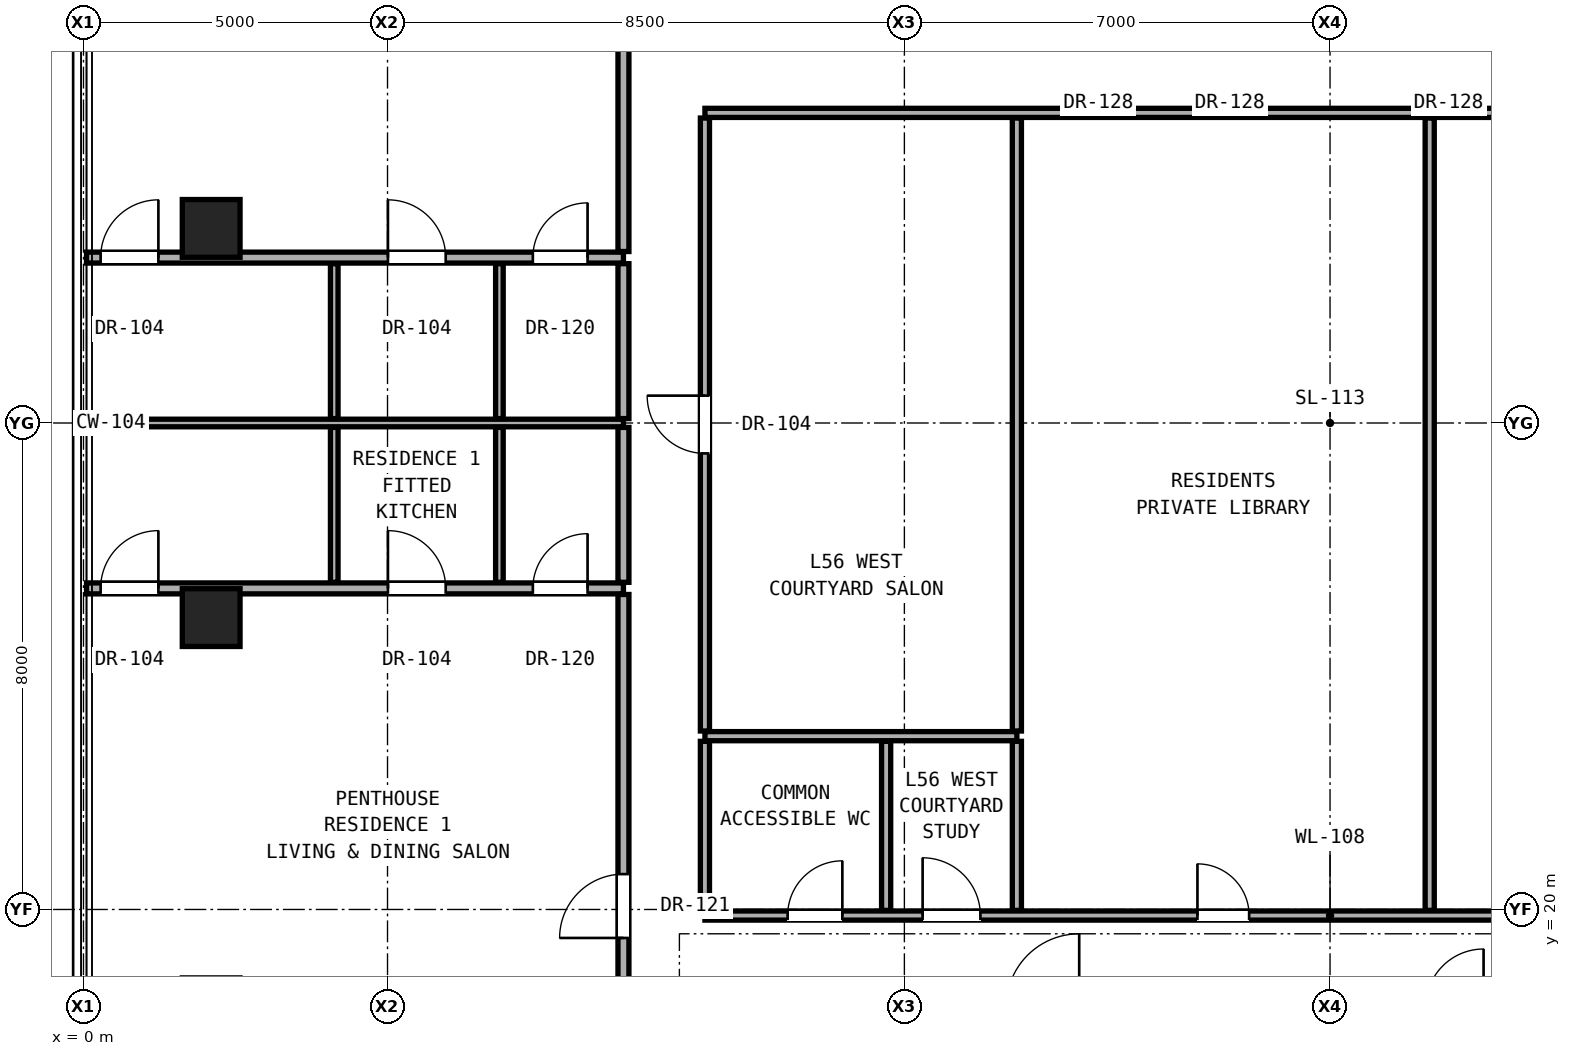
"""IFC4 building model, lengths in metres.
Left out: names, types, materials, properties, quantities, classifications, styles, units other than length and angle.
Written with IfcOpenShell. Run it as: python <this file> out.ifc"""

import sys

from ifc_helpers import new_model, si_unit, direction, frame, frame_2d, origin, origin_2d, place, context, subcontext, project, spatial, rectangle, hollow_rectangle, extrude, element, fill, save


model = new_model("IFC4")
c1 = context("Model", 3, precision=1e-05, world=origin(), true_north=direction((0.0, 1.0)))
c2 = subcontext(c1, "Body", "Model", "MODEL_VIEW")
j1 = project(units=[si_unit("LENGTHUNIT", "METRE"), si_unit("PLANEANGLEUNIT", "RADIAN")], contexts=[c1])
p1 = place(None, origin())
s1 = spatial("IfcSite", under=j1, at=p1, CompositionType="ELEMENT")
p2 = place(p1, origin())
s2 = spatial("IfcBuilding", under=s1, at=p2, CompositionType="ELEMENT")
p3 = place(p2, frame((0.0, 0.0, 196.65)))
s3 = spatial("IfcBuildingStorey", under=s2, at=p3, CompositionType="ELEMENT", Elevation=196.65)
for number, where, z_axis, x_axis in (
    (1, (2.1, 24.8, 0.0), (0.0, 0.0, 1.0), (1.0, 0.0, 0.0)),
    (2, (2.1, 31.2, 0.0), (0.0, 0.0, 1.0), (1.0, 0.0, 0.0)),
):
    element("IfcColumn", number, at=place(p3, frame(where, z_axis=z_axis, x_axis=x_axis)), inside=s3, PredefinedType="COLUMN", context=c2, shape_type="SweptSolid", body=[
        extrude(hollow_rectangle(XDim=0.95, YDim=0.95, WallThickness=0.05, at=origin_2d()), origin(), (0.0, 0.0, 1.0), 3.25),
    ])
p4 = place(p3, frame((10.22, 19.9, 0.0), z_axis=(0.0, 0.0, 1.0), x_axis=(1.0, 0.0, 0.0)))
e3 = element("IfcWall", 3, at=p4, inside=s3, PredefinedType="PARTITIONING", context=c2, shape_type="SweptSolid", body=[
    extrude(rectangle(XDim=20.56, YDim=0.15, at=frame_2d((10.28, 0.0))), origin(), (0.0, 0.0, 1.0), 2.186),
])
p5 = place(p4, frame((1.36, 0.0, 0.0)))
e4 = element("IfcOpeningElement", 4, at=p5, cuts=e3, PredefinedType="OPENING", context=c2, shape_type="SweptSolid", body=[
    extrude(rectangle(XDim=0.9, YDim=2.1, at=frame_2d((0.45, 1.05))), frame((0.0, 0.085, 0.0), z_axis=(0.0, -1.0, 0.0), x_axis=(1.0, 0.0, 0.0)), (0.0, 0.0, 1.0), 0.17),
])
p6 = place(p4, frame((3.58, 0.0, 0.0)))
e5 = element("IfcOpeningElement", 5, at=p6, cuts=e3, PredefinedType="OPENING", context=c2, shape_type="SweptSolid", body=[
    extrude(rectangle(XDim=0.95, YDim=2.15, at=frame_2d((0.475, 1.075))), frame((0.0, 0.085, 0.0), z_axis=(0.0, -1.0, 0.0), x_axis=(1.0, 0.0, 0.0)), (0.0, 0.0, 1.0), 0.17),
])
p7 = place(p4, frame((8.1, 0.0, 0.0)))
e6 = element("IfcOpeningElement", 6, at=p7, cuts=e3, PredefinedType="OPENING", context=c2, shape_type="SweptSolid", body=[
    extrude(rectangle(XDim=0.85, YDim=2.01, at=frame_2d((0.425, 1.005))), frame((0.0, 0.085, 0.0), z_axis=(0.0, -1.0, 0.0), x_axis=(1.0, 0.0, 0.0)), (0.0, 0.0, 1.0), 0.17),
])
p8 = place(p3, frame((10.22, 22.85, 0.0), z_axis=(0.0, 0.0, 1.0), x_axis=(1.0, 0.0, 0.0)))
e7 = element("IfcWall", 7, at=p8, inside=s3, PredefinedType="PARTITIONING", context=c2, shape_type="SweptSolid", body=[
    extrude(rectangle(XDim=5.13, YDim=0.15, at=frame_2d((2.565, 0.0))), origin(), (0.0, 0.0, 1.0), 2.186),
])
p9 = place(p3, frame((0.05, 25.28, 0.0), z_axis=(0.0, 0.0, 1.0), x_axis=(1.0, 0.0, 0.0)))
e8 = element("IfcWall", 8, at=p9, inside=s3, PredefinedType="PARTITIONING", context=c2, shape_type="SweptSolid", body=[
    extrude(rectangle(XDim=8.83, YDim=0.18, at=frame_2d((4.415, 0.0))), origin(), (0.0, 0.0, 1.0), 2.269),
])
p10 = place(p9, frame((0.232, 0.0, 0.0)))
e9 = element("IfcOpeningElement", 9, at=p10, cuts=e8, PredefinedType="OPENING", context=c2, shape_type="SweptSolid", body=[
    extrude(rectangle(XDim=0.95, YDim=2.15, at=frame_2d((0.475, 1.075))), frame((0.0, 0.1, 0.0), z_axis=(0.0, -1.0, 0.0), x_axis=(1.0, 0.0, 0.0)), (0.0, 0.0, 1.0), 0.2),
])
p11 = place(p9, frame((4.957, 0.0, 0.0)))
e10 = element("IfcOpeningElement", 10, at=p11, cuts=e8, PredefinedType="OPENING", context=c2, shape_type="SweptSolid", body=[
    extrude(rectangle(XDim=0.95, YDim=2.15, at=frame_2d((0.475, 1.075))), frame((0.0, 0.1, 0.0), z_axis=(0.0, -1.0, 0.0), x_axis=(1.0, 0.0, 0.0)), (0.0, 0.0, 1.0), 0.2),
])
p12 = place(p9, frame((7.34, 0.0, 0.0)))
e11 = element("IfcOpeningElement", 11, at=p12, cuts=e8, PredefinedType="OPENING", context=c2, shape_type="SweptSolid", body=[
    extrude(rectangle(XDim=0.9, YDim=2.1, at=frame_2d((0.45, 1.05))), frame((0.0, 0.1, 0.0), z_axis=(0.0, -1.0, 0.0), x_axis=(1.0, 0.0, 0.0)), (0.0, 0.0, 1.0), 0.2),
])
p13 = place(p3, frame((0.05, 28.0, 0.0), z_axis=(0.0, 0.0, 1.0), x_axis=(1.0, 0.0, 0.0)))
e12 = element("IfcWall", 12, at=p13, inside=s3, PredefinedType="PARTITIONING", context=c2, shape_type="SweptSolid", body=[
    extrude(rectangle(XDim=8.83, YDim=0.125, at=frame_2d((4.415, 0.0))), origin(), (0.0, 0.0, 1.0), 2.269),
])
p14 = place(p3, frame((0.05, 30.72, 0.0), z_axis=(0.0, 0.0, 1.0), x_axis=(1.0, 0.0, 0.0)))
e13 = element("IfcWall", 13, at=p14, inside=s3, PredefinedType="PARTITIONING", context=c2, shape_type="SweptSolid", body=[
    extrude(rectangle(XDim=8.83, YDim=0.18, at=frame_2d((4.415, 0.0))), origin(), (0.0, 0.0, 1.0), 2.269),
])
p15 = place(p14, frame((0.232, 0.0, 0.0)))
e14 = element("IfcOpeningElement", 14, at=p15, cuts=e13, PredefinedType="OPENING", context=c2, shape_type="SweptSolid", body=[
    extrude(rectangle(XDim=0.95, YDim=2.15, at=frame_2d((0.475, 1.075))), frame((0.0, 0.1, 0.0), z_axis=(0.0, -1.0, 0.0), x_axis=(1.0, 0.0, 0.0)), (0.0, 0.0, 1.0), 0.2),
])
p16 = place(p14, frame((4.957, 0.0, 0.0)))
e15 = element("IfcOpeningElement", 15, at=p16, cuts=e13, PredefinedType="OPENING", context=c2, shape_type="SweptSolid", body=[
    extrude(rectangle(XDim=0.95, YDim=2.15, at=frame_2d((0.475, 1.075))), frame((0.0, 0.1, 0.0), z_axis=(0.0, -1.0, 0.0), x_axis=(1.0, 0.0, 0.0)), (0.0, 0.0, 1.0), 0.2),
])
p17 = place(p14, frame((7.34, 0.0, 0.0)))
e16 = element("IfcOpeningElement", 16, at=p17, cuts=e13, PredefinedType="OPENING", context=c2, shape_type="SweptSolid", body=[
    extrude(rectangle(XDim=0.9, YDim=2.1, at=frame_2d((0.45, 1.05))), frame((0.0, 0.1, 0.0), z_axis=(0.0, -1.0, 0.0), x_axis=(1.0, 0.0, 0.0)), (0.0, 0.0, 1.0), 0.2),
])
p18 = place(p3, frame((10.22, 33.1, 0.0), z_axis=(0.0, 0.0, 1.0), x_axis=(1.0, 0.0, 0.0)))
e17 = element("IfcWall", 17, at=p18, inside=s3, PredefinedType="PARTITIONING", context=c2, shape_type="SweptSolid", body=[
    extrude(rectangle(XDim=20.56, YDim=0.15, at=frame_2d((10.28, 0.0))), origin(), (0.0, 0.0, 1.0), 2.186),
])
p19 = place(p18, frame((15.794, 0.0, 0.0)))
e18 = element("IfcOpeningElement", 18, at=p19, cuts=e17, PredefinedType="OPENING", context=c2, shape_type="SweptSolid", body=[
    extrude(rectangle(XDim=0.85, YDim=2.01, at=frame_2d((0.425, 1.005))), frame((0.0, 0.085, 0.0), z_axis=(0.0, -1.0, 0.0), x_axis=(1.0, 0.0, 0.0)), (0.0, 0.0, 1.0), 0.17),
])
for number, where, z_axis, x_axis in (
    (19, (4.124, 25.38, 0.0), (0.0, 0.0, 1.0), (0.0, 1.0, 0.0)),
    (20, (4.124, 28.073, 0.0), (0.0, 0.0, 1.0), (0.0, 1.0, 0.0)),
    (21, (6.84, 25.38, 0.0), (0.0, 0.0, 1.0), (0.0, 1.0, 0.0)),
    (22, (6.84, 28.073, 0.0), (0.0, 0.0, 1.0), (0.0, 1.0, 0.0)),
):
    element("IfcWall", number, at=place(p3, frame(where, z_axis=z_axis, x_axis=x_axis)), inside=s3, PredefinedType="PARTITIONING", context=c2, shape_type="SweptSolid", body=[
        extrude(rectangle(XDim=2.548, YDim=0.125, at=frame_2d((1.274, 0.0))), origin(), (0.0, 0.0, 1.0), 3.05),
    ])
p20 = place(p3, frame((8.88, 14.933, 0.0), z_axis=(0.0, 0.0, 1.0), x_axis=(0.0, 1.0, 0.0)))
e23 = element("IfcWall", 23, at=p20, inside=s3, PredefinedType="PARTITIONING", context=c2, shape_type="SweptSolid", body=[
    extrude(rectangle(XDim=10.247, YDim=0.18, at=frame_2d((5.124, 0.0))), origin(), (0.0, 0.0, 1.0), 2.346),
])
p21 = place(p20, frame((4.598, 0.0, 0.0)))
e24 = element("IfcOpeningElement", 24, at=p21, cuts=e23, PredefinedType="OPENING", context=c2, shape_type="SweptSolid", body=[
    extrude(rectangle(XDim=1.05, YDim=2.2, at=frame_2d((0.525, 1.1))), frame((0.0, 0.1, 0.0), z_axis=(0.0, -1.0, 0.0), x_axis=(1.0, 0.0, 0.0)), (0.0, 0.0, 1.0), 0.2),
])
for number, where, z_axis, x_axis in (
    (25, (8.88, 25.38, 0.0), (0.0, 0.0, 1.0), (0.0, 1.0, 0.0)),
    (26, (8.88, 28.073, 0.0), (0.0, 0.0, 1.0), (0.0, 1.0, 0.0)),
):
    element("IfcWall", number, at=place(p3, frame(where, z_axis=z_axis, x_axis=x_axis)), inside=s3, PredefinedType="PARTITIONING", context=c2, shape_type="SweptSolid", body=[
        extrude(rectangle(XDim=2.548, YDim=0.18, at=frame_2d((1.274, 0.0))), origin(), (0.0, 0.0, 1.0), 3.05),
    ])
p22 = place(p3, frame((8.88, 30.82, 0.0), z_axis=(0.0, 0.0, 1.0), x_axis=(0.0, 1.0, 0.0)))
e27 = element("IfcWall", 27, at=p22, inside=s3, PredefinedType="PARTITIONING", context=c2, shape_type="SweptSolid", body=[
    extrude(rectangle(XDim=10.247, YDim=0.18, at=frame_2d((5.124, 0.0))), origin(), (0.0, 0.0, 1.0), 2.346),
])
p23 = place(p22, frame((4.598, 0.0, 0.0)))
e28 = element("IfcOpeningElement", 28, at=p23, cuts=e27, PredefinedType="OPENING", context=c2, shape_type="SweptSolid", body=[
    extrude(rectangle(XDim=1.05, YDim=2.2, at=frame_2d((0.525, 1.1))), frame((0.0, 0.1, 0.0), z_axis=(0.0, -1.0, 0.0), x_axis=(1.0, 0.0, 0.0)), (0.0, 0.0, 1.0), 0.2),
])
p24 = place(p3, frame((10.22, 19.985, 0.0), z_axis=(0.0, 0.0, 1.0), x_axis=(0.0, 1.0, 0.0)))
e29 = element("IfcWall", 29, at=p24, inside=s3, PredefinedType="PARTITIONING", context=c2, shape_type="SweptSolid", body=[
    extrude(rectangle(XDim=2.78, YDim=0.15, at=frame_2d((1.39, 0.0))), origin(), (0.0, 0.0, 1.0), 3.05),
])
p25 = place(p3, frame((10.22, 22.935, 0.0), z_axis=(0.0, 0.0, 1.0), x_axis=(0.0, 1.0, 0.0)))
e30 = element("IfcWall", 30, at=p25, inside=s3, PredefinedType="PARTITIONING", context=c2, shape_type="SweptSolid", body=[
    extrude(rectangle(XDim=10.08, YDim=0.15, at=frame_2d((5.04, 0.0))), origin(), (0.0, 0.0, 1.0), 2.346),
])
p26 = place(p25, frame((4.565, 0.0, 0.0)))
e31 = element("IfcOpeningElement", 31, at=p26, cuts=e30, PredefinedType="OPENING", context=c2, shape_type="SweptSolid", body=[
    extrude(rectangle(XDim=0.95, YDim=2.15, at=frame_2d((0.475, 1.075))), frame((0.0, 0.085, 0.0), z_axis=(0.0, -1.0, 0.0), x_axis=(1.0, 0.0, 0.0)), (0.0, 0.0, 1.0), 0.17),
])
for number, where, z_axis, x_axis in (
    (32, (13.2, 19.985, 0.0), (0.0, 0.0, 1.0), (0.0, 1.0, 0.0)),
    (33, (15.35, 19.985, 0.0), (0.0, 0.0, 1.0), (0.0, 1.0, 0.0)),
):
    element("IfcWall", number, at=place(p3, frame(where, z_axis=z_axis, x_axis=x_axis)), inside=s3, PredefinedType="PARTITIONING", context=c2, shape_type="SweptSolid", body=[
        extrude(rectangle(XDim=2.78, YDim=0.15, at=frame_2d((1.39, 0.0))), origin(), (0.0, 0.0, 1.0), 3.05),
    ])
p27 = place(p3, frame((15.35, 22.935, 0.0), z_axis=(0.0, 0.0, 1.0), x_axis=(0.0, 1.0, 0.0)))
e34 = element("IfcWall", 34, at=p27, inside=s3, PredefinedType="PARTITIONING", context=c2, shape_type="SweptSolid", body=[
    extrude(rectangle(XDim=10.08, YDim=0.15, at=frame_2d((5.04, 0.0))), origin(), (0.0, 0.0, 1.0), 2.186),
])
p28 = place(p3, frame((22.139, 19.985, 0.0), z_axis=(0.0, 0.0, 1.0), x_axis=(0.0, 1.0, 0.0)))
e35 = element("IfcWall", 35, at=p28, inside=s3, PredefinedType="PARTITIONING", context=c2, shape_type="SweptSolid", body=[
    extrude(rectangle(XDim=13.03, YDim=0.15, at=frame_2d((6.515, 0.0))), origin(), (0.0, 0.0, 1.0), 2.186),
])
p29 = place(p5, origin())
e36 = element("IfcDoor", 36, at=p29, inside=s3, OperationType="SINGLE_SWING_RIGHT", PredefinedType="DOOR", context=c2, shape_type="SweptSolid", body=[
    extrude(rectangle(XDim=0.9, YDim=2.1, at=frame_2d((0.45, 1.05))), frame((0.0, 0.025, 0.0), z_axis=(0.0, -1.0, 0.0), x_axis=(1.0, 0.0, 0.0)), (0.0, 0.0, 1.0), 0.05),
])
fill(e4, e36)
p30 = place(p21, origin())
e37 = element("IfcDoor", 37, at=p30, inside=s3, OperationType="SINGLE_SWING_LEFT", PredefinedType="DOOR", context=c2, shape_type="SweptSolid", body=[
    extrude(rectangle(XDim=1.05, YDim=2.2, at=frame_2d((0.525, 1.1))), frame((0.0, 0.025, 0.0), z_axis=(0.0, -1.0, 0.0), x_axis=(1.0, 0.0, 0.0)), (0.0, 0.0, 1.0), 0.05),
])
fill(e24, e37)
p31 = place(p10, origin())
e38 = element("IfcDoor", 38, at=p31, inside=s3, OperationType="SINGLE_SWING_RIGHT", PredefinedType="DOOR", context=c2, shape_type="SweptSolid", body=[
    extrude(rectangle(XDim=0.95, YDim=2.15, at=frame_2d((0.475, 1.075))), frame((0.0, 0.025, 0.0), z_axis=(0.0, -1.0, 0.0), x_axis=(1.0, 0.0, 0.0)), (0.0, 0.0, 1.0), 0.05),
])
fill(e9, e38)
p32 = place(p11, origin())
e39 = element("IfcDoor", 39, at=p32, inside=s3, OperationType="SINGLE_SWING_LEFT", PredefinedType="DOOR", context=c2, shape_type="SweptSolid", body=[
    extrude(rectangle(XDim=0.95, YDim=2.15, at=frame_2d((0.475, 1.075))), frame((0.0, 0.025, 0.0), z_axis=(0.0, -1.0, 0.0), x_axis=(1.0, 0.0, 0.0)), (0.0, 0.0, 1.0), 0.05),
])
fill(e10, e39)
p33 = place(p12, origin())
e40 = element("IfcDoor", 40, at=p33, inside=s3, OperationType="SINGLE_SWING_RIGHT", PredefinedType="DOOR", context=c2, shape_type="SweptSolid", body=[
    extrude(rectangle(XDim=0.9, YDim=2.1, at=frame_2d((0.45, 1.05))), frame((0.0, 0.025, 0.0), z_axis=(0.0, -1.0, 0.0), x_axis=(1.0, 0.0, 0.0)), (0.0, 0.0, 1.0), 0.05),
])
fill(e11, e40)
p34 = place(p15, origin())
e41 = element("IfcDoor", 41, at=p34, inside=s3, OperationType="SINGLE_SWING_RIGHT", PredefinedType="DOOR", context=c2, shape_type="SweptSolid", body=[
    extrude(rectangle(XDim=0.95, YDim=2.15, at=frame_2d((0.475, 1.075))), frame((0.0, 0.025, 0.0), z_axis=(0.0, -1.0, 0.0), x_axis=(1.0, 0.0, 0.0)), (0.0, 0.0, 1.0), 0.05),
])
fill(e14, e41)
p35 = place(p16, origin())
e42 = element("IfcDoor", 42, at=p35, inside=s3, OperationType="SINGLE_SWING_LEFT", PredefinedType="DOOR", context=c2, shape_type="SweptSolid", body=[
    extrude(rectangle(XDim=0.95, YDim=2.15, at=frame_2d((0.475, 1.075))), frame((0.0, 0.025, 0.0), z_axis=(0.0, -1.0, 0.0), x_axis=(1.0, 0.0, 0.0)), (0.0, 0.0, 1.0), 0.05),
])
fill(e15, e42)
p36 = place(p17, origin())
e43 = element("IfcDoor", 43, at=p36, inside=s3, OperationType="SINGLE_SWING_RIGHT", PredefinedType="DOOR", context=c2, shape_type="SweptSolid", body=[
    extrude(rectangle(XDim=0.9, YDim=2.1, at=frame_2d((0.45, 1.05))), frame((0.0, 0.025, 0.0), z_axis=(0.0, -1.0, 0.0), x_axis=(1.0, 0.0, 0.0)), (0.0, 0.0, 1.0), 0.05),
])
fill(e16, e43)
p37 = place(p6, origin())
e44 = element("IfcDoor", 44, at=p37, inside=s3, OperationType="SINGLE_SWING_LEFT", PredefinedType="DOOR", context=c2, shape_type="SweptSolid", body=[
    extrude(rectangle(XDim=0.95, YDim=2.15, at=frame_2d((0.475, 1.075))), frame((0.0, 0.025, 0.0), z_axis=(0.0, -1.0, 0.0), x_axis=(1.0, 0.0, 0.0)), (0.0, 0.0, 1.0), 0.05),
])
fill(e5, e44)
p38 = place(p26, origin())
e45 = element("IfcDoor", 45, at=p38, inside=s3, OperationType="SINGLE_SWING_RIGHT", PredefinedType="DOOR", context=c2, shape_type="SweptSolid", body=[
    extrude(rectangle(XDim=0.95, YDim=2.15, at=frame_2d((0.475, 1.075))), frame((0.0, 0.025, 0.0), z_axis=(0.0, -1.0, 0.0), x_axis=(1.0, 0.0, 0.0)), (0.0, 0.0, 1.0), 0.05),
])
fill(e31, e45)
p39 = place(p7, origin())
e46 = element("IfcDoor", 46, at=p39, inside=s3, OperationType="SINGLE_SWING_LEFT", PredefinedType="DOOR", context=c2, shape_type="SweptSolid", body=[
    extrude(rectangle(XDim=0.85, YDim=2.01, at=frame_2d((0.425, 1.005))), frame((0.0, 0.025, 0.0), z_axis=(0.0, -1.0, 0.0), x_axis=(1.0, 0.0, 0.0)), (0.0, 0.0, 1.0), 0.05),
])
fill(e6, e46)
save(model, sys.argv[1])
